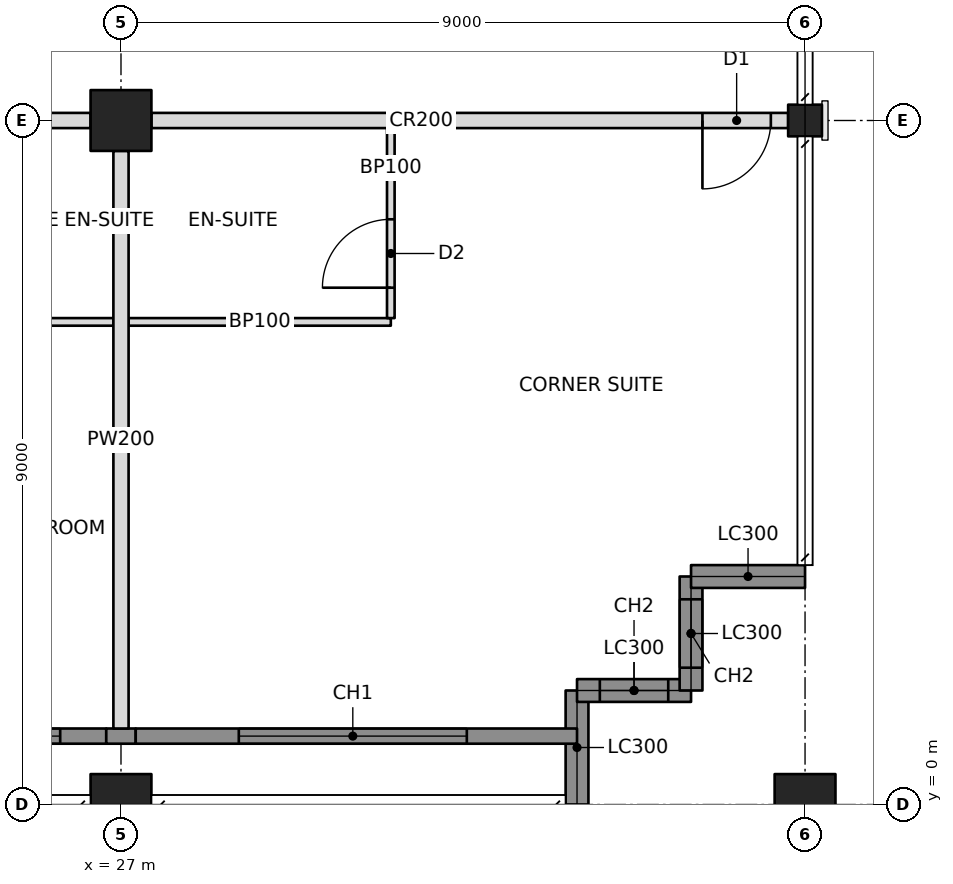
"""IFC4 building model, lengths in metres.
Left out: names, types, materials, properties, quantities, classifications, styles, units other than length and angle.
Written with IfcOpenShell. Run it as: python <this file> out.ifc"""

import sys

from ifc_helpers import new_model, si_unit, direction, frame, frame_2d, origin, origin_2d, place, context, subcontext, project, spatial, rectangle, hollow_rectangle, i_section, extrude, element, fill, save


model = new_model("IFC4")
c1 = context("Model", 3, precision=1e-05, world=origin(), true_north=direction((0.0, 1.0)))
c2 = subcontext(c1, "Body", "Model", "MODEL_VIEW")
j1 = project(units=[si_unit("LENGTHUNIT", "METRE"), si_unit("PLANEANGLEUNIT", "RADIAN")], contexts=[c1])
p1 = place(None, origin())
s1 = spatial("IfcSite", under=j1, at=p1, CompositionType="ELEMENT")
p2 = place(p1, origin())
s2 = spatial("IfcBuilding", under=s1, at=p2, CompositionType="ELEMENT")
p3 = place(p2, frame((0.0, 0.0, 255.4)))
s3 = spatial("IfcBuildingStorey", under=s2, at=p3, CompositionType="ELEMENT", Elevation=255.4)
for number, where, z_axis, x_axis in (
    (1, (27.0, 0.0, 0.0), (0.0, 0.0, 1.0), (1.0, 0.0, 0.0)),
    (2, (27.0, 9.0, 0.0), (0.0, 0.0, 1.0), (1.0, 0.0, 0.0)),
    (3, (36.0, 0.0, 0.0), (0.0, 0.0, 1.0), (1.0, 0.0, 0.0)),
):
    element("IfcColumn", number, at=place(p3, frame(where, z_axis=z_axis, x_axis=x_axis)), inside=s3, PredefinedType="COLUMN", context=c2, shape_type="SweptSolid", body=[
        extrude(hollow_rectangle(XDim=0.8, YDim=0.8, WallThickness=0.032, at=origin_2d()), origin(), (0.0, 0.0, 1.0), 3.6),
    ])
p4 = place(p3, frame((36.0, 9.0, 0.0), z_axis=(0.0, 0.0, 1.0), x_axis=(0.0, 1.0, 0.0)))
e4 = element("IfcColumn", 4, at=p4, inside=s3, PredefinedType="COLUMN", context=c2, shape_type="SweptSolid", body=[
    extrude(i_section(OverallWidth=0.417, OverallDepth=0.445, WebThickness=0.039, FlangeThickness=0.063, at=origin_2d()), origin(), (0.0, 0.0, 1.0), 3.6),
])
p5 = place(p3, frame((33.0, 0.0, 0.0), z_axis=(0.0, 0.0, 1.0), x_axis=(0.0, 1.0, 0.0)))
e5 = element("IfcWall", 5, at=p5, inside=s3, PredefinedType="SOLIDWALL", context=c2, shape_type="SweptSolid", body=[
    extrude(rectangle(XDim=1.5, YDim=0.3, at=frame_2d((0.75, 0.0))), origin(), (0.0, 0.0, 1.0), 2.62),
])
p6 = place(p3, frame((33.0, 1.5, 0.0), z_axis=(0.0, 0.0, 1.0), x_axis=(1.0, 0.0, 0.0)))
e6 = element("IfcWall", 6, at=p6, inside=s3, PredefinedType="SOLIDWALL", context=c2, shape_type="SweptSolid", body=[
    extrude(rectangle(XDim=1.5, YDim=0.3, at=frame_2d((0.75, 0.0))), origin(), (0.0, 0.0, 1.0), 3.4),
])
p7 = place(p6, frame((0.3, 0.0, 0.6)))
e7 = element("IfcOpeningElement", 7, at=p7, cuts=e6, PredefinedType="OPENING", context=c2, shape_type="SweptSolid", body=[
    extrude(rectangle(XDim=0.9, YDim=2.2, at=frame_2d((0.45, 1.1))), frame((0.0, 0.16, 0.0), z_axis=(0.0, -1.0, 0.0), x_axis=(1.0, 0.0, 0.0)), (0.0, 0.0, 1.0), 0.32),
])
p8 = place(p3, frame((34.5, 1.5, 0.0), z_axis=(0.0, 0.0, 1.0), x_axis=(0.0, 1.0, 0.0)))
e8 = element("IfcWall", 8, at=p8, inside=s3, PredefinedType="SOLIDWALL", context=c2, shape_type="SweptSolid", body=[
    extrude(rectangle(XDim=1.5, YDim=0.3, at=frame_2d((0.75, 0.0))), origin(), (0.0, 0.0, 1.0), 3.4),
])
p9 = place(p8, frame((0.3, 0.0, 0.6)))
e9 = element("IfcOpeningElement", 9, at=p9, cuts=e8, PredefinedType="OPENING", context=c2, shape_type="SweptSolid", body=[
    extrude(rectangle(XDim=0.9, YDim=2.2, at=frame_2d((0.45, 1.1))), frame((0.0, 0.16, 0.0), z_axis=(0.0, -1.0, 0.0), x_axis=(1.0, 0.0, 0.0)), (0.0, 0.0, 1.0), 0.32),
])
p10 = place(p3, frame((34.5, 3.0, 0.0), z_axis=(0.0, 0.0, 1.0), x_axis=(1.0, 0.0, 0.0)))
e10 = element("IfcWall", 10, at=p10, inside=s3, PredefinedType="SOLIDWALL", context=c2, shape_type="SweptSolid", body=[
    extrude(rectangle(XDim=1.5, YDim=0.3, at=frame_2d((0.75, 0.0))), origin(), (0.0, 0.0, 1.0), 2.62),
])
p11 = place(p3, frame((18.4, 9.0, 0.0), z_axis=(0.0, 0.0, 1.0), x_axis=(1.0, 0.0, 0.0)))
e11 = element("IfcWall", 11, at=p11, inside=s3, PredefinedType="PARTITIONING", context=c2, shape_type="SweptSolid", body=[
    extrude(rectangle(XDim=8.2, YDim=0.2, at=frame_2d((4.1, 0.0))), origin(), (0.0, 0.0, 1.0), 2.605),
])
p12 = place(p11, frame((2.95, 0.0, 0.0)))
e12 = element("IfcOpeningElement", 12, at=p12, cuts=e11, PredefinedType="OPENING", context=c2, shape_type="SweptSolid", body=[
    extrude(rectangle(XDim=0.9, YDim=2.1, at=frame_2d((0.45, 1.05))), frame((0.0, 0.11, 0.0), z_axis=(0.0, -1.0, 0.0), x_axis=(1.0, 0.0, 0.0)), (0.0, 0.0, 1.0), 0.22),
])
p13 = place(p11, frame((4.35, 0.0, 0.0)))
e13 = element("IfcOpeningElement", 13, at=p13, cuts=e11, PredefinedType="OPENING", context=c2, shape_type="SweptSolid", body=[
    extrude(rectangle(XDim=0.9, YDim=2.1, at=frame_2d((0.45, 1.05))), frame((0.0, 0.11, 0.0), z_axis=(0.0, -1.0, 0.0), x_axis=(1.0, 0.0, 0.0)), (0.0, 0.0, 1.0), 0.22),
])
p14 = place(p3, frame((27.4, 9.0, 0.0), z_axis=(0.0, 0.0, 1.0), x_axis=(1.0, 0.0, 0.0)))
e14 = element("IfcWall", 14, at=p14, inside=s3, PredefinedType="PARTITIONING", context=c2, shape_type="SweptSolid", body=[
    extrude(rectangle(XDim=8.378, YDim=0.2, at=frame_2d((4.189, 0.0))), origin(), (0.0, 0.0, 1.0), 2.605),
])
p15 = place(p14, frame((7.25, 0.0, 0.0)))
e15 = element("IfcOpeningElement", 15, at=p15, cuts=e14, PredefinedType="OPENING", context=c2, shape_type="SweptSolid", body=[
    extrude(rectangle(XDim=0.9, YDim=2.1, at=frame_2d((0.45, 1.05))), frame((0.0, 0.11, 0.0), z_axis=(0.0, -1.0, 0.0), x_axis=(1.0, 0.0, 0.0)), (0.0, 0.0, 1.0), 0.22),
])
p16 = place(p3, frame((27.0, 8.6, 0.0), z_axis=(0.0, 0.0, 1.0), x_axis=(0.0, -1.0, 0.0)))
e16 = element("IfcWall", 16, at=p16, inside=s3, PredefinedType="PARTITIONING", context=c2, shape_type="SweptSolid", body=[
    extrude(rectangle(XDim=7.6, YDim=0.2, at=frame_2d((3.8, 0.0))), origin(), (0.0, 0.0, 1.0), 2.605),
])
p17 = place(p3, frame((23.95, 6.35, 0.0), z_axis=(0.0, 0.0, 1.0), x_axis=(1.0, 0.0, 0.0)))
e17 = element("IfcWall", 17, at=p17, inside=s3, PredefinedType="PARTITIONING", context=c2, shape_type="SweptSolid", body=[
    extrude(rectangle(XDim=2.95, YDim=0.1, at=frame_2d((1.475, 0.0))), origin(), (0.0, 0.0, 1.0), 2.604),
])
p18 = place(p3, frame((27.1, 6.35, 0.0), z_axis=(0.0, 0.0, 1.0), x_axis=(1.0, 0.0, 0.0)))
e18 = element("IfcWall", 18, at=p18, inside=s3, PredefinedType="PARTITIONING", context=c2, shape_type="SweptSolid", body=[
    extrude(rectangle(XDim=3.45, YDim=0.1, at=frame_2d((1.725, 0.0))), origin(), (0.0, 0.0, 1.0), 2.604),
])
p19 = place(p3, frame((30.55, 8.9, 0.0), z_axis=(0.0, 0.0, 1.0), x_axis=(0.0, -1.0, 0.0)))
e19 = element("IfcWall", 19, at=p19, inside=s3, PredefinedType="PARTITIONING", context=c2, shape_type="SweptSolid", body=[
    extrude(rectangle(XDim=2.5, YDim=0.1, at=frame_2d((1.25, 0.0))), origin(), (0.0, 0.0, 1.0), 2.604),
])
p20 = place(p19, frame((1.2, 0.0, 0.0)))
e20 = element("IfcOpeningElement", 20, at=p20, cuts=e19, PredefinedType="OPENING", context=c2, shape_type="SweptSolid", body=[
    extrude(rectangle(XDim=0.9, YDim=2.1, at=frame_2d((0.45, 1.05))), frame((0.0, 0.06, 0.0), z_axis=(0.0, -1.0, 0.0), x_axis=(1.0, 0.0, 0.0)), (0.0, 0.0, 1.0), 0.12),
])
p21 = place(p3, frame((18.194, 0.9, 0.0), z_axis=(0.0, 0.0, 1.0), x_axis=(1.0, 0.0, 0.0)))
e21 = element("IfcWall", 21, at=p21, inside=s3, PredefinedType="SOLIDWALL", context=c2, shape_type="SweptSolid", body=[
    extrude(rectangle(XDim=8.612, YDim=0.2, at=frame_2d((4.306, 0.0))), origin(), (0.0, 0.0, 1.0), 3.4),
])
p22 = place(p21, frame((0.606, 0.0, 0.6)))
e22 = element("IfcOpeningElement", 22, at=p22, cuts=e21, PredefinedType="OPENING", context=c2, shape_type="SweptSolid", body=[
    extrude(rectangle(XDim=3.0, YDim=2.2, at=frame_2d((1.5, 1.1))), frame((0.0, 0.11, 0.0), z_axis=(0.0, -1.0, 0.0), x_axis=(1.0, 0.0, 0.0)), (0.0, 0.0, 1.0), 0.22),
])
p23 = place(p21, frame((5.006, 0.0, 0.6)))
e23 = element("IfcOpeningElement", 23, at=p23, cuts=e21, PredefinedType="OPENING", context=c2, shape_type="SweptSolid", body=[
    extrude(rectangle(XDim=3.0, YDim=2.2, at=frame_2d((1.5, 1.1))), frame((0.0, 0.11, 0.0), z_axis=(0.0, -1.0, 0.0), x_axis=(1.0, 0.0, 0.0)), (0.0, 0.0, 1.0), 0.22),
])
p24 = place(p3, frame((26.806, 0.9, 0.0), z_axis=(0.0, 0.0, 1.0), x_axis=(1.0, 0.0, 0.0)))
e24 = element("IfcWall", 24, at=p24, inside=s3, PredefinedType="SOLIDWALL", context=c2, shape_type="SweptSolid", body=[
    extrude(rectangle(XDim=0.388, YDim=0.2, at=frame_2d((0.194, 0.0))), origin(), (0.0, 0.0, 1.0), 2.604),
])
p25 = place(p3, frame((27.194, 0.9, 0.0), z_axis=(0.0, 0.0, 1.0), x_axis=(1.0, 0.0, 0.0)))
e25 = element("IfcWall", 25, at=p25, inside=s3, PredefinedType="SOLIDWALL", context=c2, shape_type="SweptSolid", body=[
    extrude(rectangle(XDim=5.806, YDim=0.2, at=frame_2d((2.903, 0.0))), origin(), (0.0, 0.0, 1.0), 3.4),
])
p26 = place(p25, frame((1.356, 0.0, 0.6)))
e26 = element("IfcOpeningElement", 26, at=p26, cuts=e25, PredefinedType="OPENING", context=c2, shape_type="SweptSolid", body=[
    extrude(rectangle(XDim=3.0, YDim=2.2, at=frame_2d((1.5, 1.1))), frame((0.0, 0.11, 0.0), z_axis=(0.0, -1.0, 0.0), x_axis=(1.0, 0.0, 0.0)), (0.0, 0.0, 1.0), 0.22),
])
p27 = place(p7, origin())
e27 = element("IfcWindow", 27, at=p27, inside=s3, PartitioningType="SINGLE_PANEL", PredefinedType="WINDOW", context=c2, shape_type="SweptSolid", body=[
    extrude(rectangle(XDim=0.9, YDim=2.2, at=frame_2d((0.45, 1.1))), frame((0.0, 0.03, 0.0), z_axis=(0.0, -1.0, 0.0), x_axis=(1.0, 0.0, 0.0)), (0.0, 0.0, 1.0), 0.06),
])
fill(e7, e27)
p28 = place(p9, origin())
e28 = element("IfcWindow", 28, at=p28, inside=s3, PartitioningType="SINGLE_PANEL", PredefinedType="WINDOW", context=c2, shape_type="SweptSolid", body=[
    extrude(rectangle(XDim=0.9, YDim=2.2, at=frame_2d((0.45, 1.1))), frame((0.0, 0.03, 0.0), z_axis=(0.0, -1.0, 0.0), x_axis=(1.0, 0.0, 0.0)), (0.0, 0.0, 1.0), 0.06),
])
fill(e9, e28)
p29 = place(p23, origin())
e29 = element("IfcWindow", 29, at=p29, inside=s3, PartitioningType="TRIPLE_PANEL_VERTICAL", PredefinedType="WINDOW", context=c2, shape_type="SweptSolid", body=[
    extrude(rectangle(XDim=3.0, YDim=2.2, at=frame_2d((1.5, 1.1))), frame((0.0, 0.03, 0.0), z_axis=(0.0, -1.0, 0.0), x_axis=(1.0, 0.0, 0.0)), (0.0, 0.0, 1.0), 0.06),
])
fill(e23, e29)
p30 = place(p26, origin())
e30 = element("IfcWindow", 30, at=p30, inside=s3, PartitioningType="TRIPLE_PANEL_VERTICAL", PredefinedType="WINDOW", context=c2, shape_type="SweptSolid", body=[
    extrude(rectangle(XDim=3.0, YDim=2.2, at=frame_2d((1.5, 1.1))), frame((0.0, 0.03, 0.0), z_axis=(0.0, -1.0, 0.0), x_axis=(1.0, 0.0, 0.0)), (0.0, 0.0, 1.0), 0.06),
])
fill(e26, e30)
p31 = place(p20, frame((0.9, 0.0, 0.0), z_axis=(0.0, 0.0, 1.0), x_axis=(-1.0, 0.0, 0.0)))
e31 = element("IfcDoor", 31, at=p31, inside=s3, OperationType="SINGLE_SWING_LEFT", PredefinedType="DOOR", context=c2, shape_type="SweptSolid", body=[
    extrude(rectangle(XDim=0.9, YDim=2.1, at=frame_2d((0.45, 1.05))), frame((0.0, 0.025, 0.0), z_axis=(0.0, -1.0, 0.0), x_axis=(1.0, 0.0, 0.0)), (0.0, 0.0, 1.0), 0.05),
])
fill(e20, e31)
p32 = place(p15, frame((0.9, 0.0, 0.0), z_axis=(0.0, 0.0, 1.0), x_axis=(-1.0, 0.0, 0.0)))
e32 = element("IfcDoor", 32, at=p32, inside=s3, OperationType="SINGLE_SWING_RIGHT", PredefinedType="DOOR", context=c2, shape_type="SweptSolid", body=[
    extrude(rectangle(XDim=0.9, YDim=2.1, at=frame_2d((0.45, 1.05))), frame((0.0, 0.025, 0.0), z_axis=(0.0, -1.0, 0.0), x_axis=(1.0, 0.0, 0.0)), (0.0, 0.0, 1.0), 0.05),
])
fill(e15, e32)
save(model, sys.argv[1])
